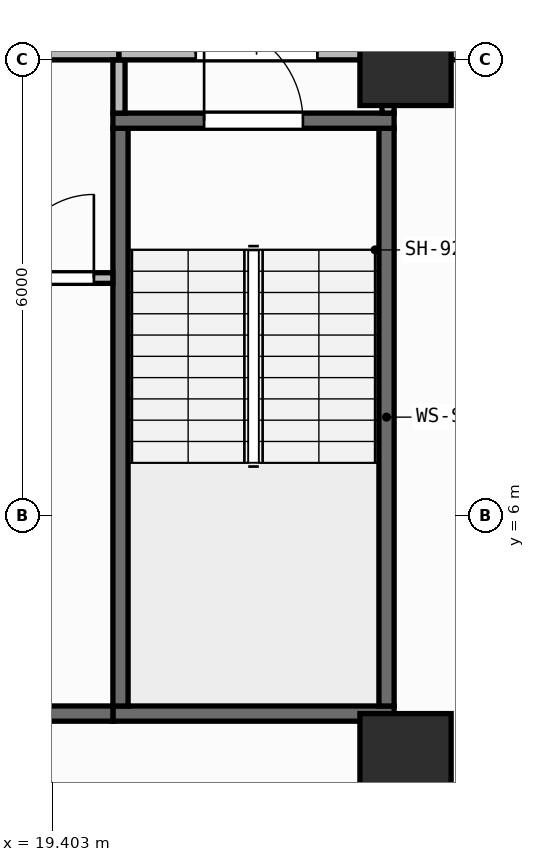
"""IFC4 building model, lengths in metres.
Left out: names, types, materials, properties, quantities, classifications, styles, units other than length and angle.
Written with IfcOpenShell. Run it as: python <this file> out.ifc"""

import sys

from ifc_helpers import new_model, si_unit, direction, frame, frame_2d, origin, origin_2d, place, context, subcontext, project, spatial, rectangle, extrude, element, fill, save


model = new_model("IFC4")
c1 = context("Model", 3, precision=1e-05, world=origin(), true_north=direction((0.0, 1.0)))
c2 = subcontext(c1, "Body", "Model", "MODEL_VIEW")
j1 = project(units=[si_unit("LENGTHUNIT", "METRE"), si_unit("PLANEANGLEUNIT", "RADIAN")], contexts=[c1])
p1 = place(None, origin())
s1 = spatial("IfcSite", under=j1, at=p1, CompositionType="ELEMENT")
p2 = place(p1, origin())
s2 = spatial("IfcBuilding", under=s1, at=p2, CompositionType="ELEMENT")
p3 = place(p2, frame((0.0, 0.0, 158.65)))
s3 = spatial("IfcBuildingStorey", under=s2, at=p3, CompositionType="ELEMENT", Elevation=158.65)
for number, where, z_axis, x_axis in (
    (1, (24.05, 2.8, 0.0), (0.0, 0.0, 1.0), (1.0, 0.0, 0.0)),
    (2, (24.05, 12.0, 0.0), (0.0, 0.0, 1.0), (1.0, 0.0, 0.0)),
):
    element("IfcColumn", number, at=place(p3, frame(where, z_axis=z_axis, x_axis=x_axis)), inside=s3, PredefinedType="COLUMN", context=c2, shape_type="SweptSolid", body=[
        extrude(rectangle(XDim=1.2, YDim=1.2, at=origin_2d()), origin(), (0.0, 0.0, 1.0), 3.95),
    ])
p4 = place(p3, frame((2.76, 0.173, 0.0), z_axis=(0.0, 0.0, 1.0), x_axis=(0.996857931723, 0.079210251617, 0.0)))
e3 = element("IfcWall", 3, at=p4, inside=s3, PredefinedType="STANDARD", context=c2, shape_type="SweptSolid", body=[
    extrude(rectangle(XDim=51.442, YDim=0.26, at=frame_2d((25.721, 0.0))), origin(), (0.0, 0.0, 1.0), 3.71),
])
p5 = place(p4, frame((24.521, 0.0, 0.9)))
e4 = element("IfcOpeningElement", 4, at=p5, cuts=e3, PredefinedType="OPENING", context=c2, shape_type="SweptSolid", body=[
    extrude(rectangle(XDim=2.4, YDim=1.65, at=frame_2d((1.2, 0.825))), frame((0.0, 0.14, 0.0), z_axis=(0.0, -1.0, 0.0), x_axis=(1.0, 0.0, 0.0)), (0.0, 0.0, 1.0), 0.28),
])
p6 = place(p3, frame((20.2, 3.4, 0.0), z_axis=(0.0, 0.0, 1.0), x_axis=(1.0, 0.0, 0.0)))
e5 = element("IfcWall", 5, at=p6, inside=s3, PredefinedType="SHEAR", context=c2, shape_type="SweptSolid", body=[
    extrude(rectangle(XDim=3.7, YDim=0.2, at=frame_2d((1.85, 0.0))), origin(), (0.0, 0.0, 1.0), 3.71),
])
for number, where, z_axis, x_axis in (
    (6, (20.3, 3.5, 0.0), (0.0, 0.0, 1.0), (0.0, 1.0, 0.0)),
    (7, (23.8, 3.5, 0.0), (0.0, 0.0, 1.0), (0.0, 1.0, 0.0)),
):
    element("IfcWall", number, at=place(p3, frame(where, z_axis=z_axis, x_axis=x_axis)), inside=s3, PredefinedType="SHEAR", context=c2, shape_type="SweptSolid", body=[
        extrude(rectangle(XDim=7.6, YDim=0.2, at=frame_2d((3.8, 0.0))), origin(), (0.0, 0.0, 1.0), 3.71),
    ])
p7 = place(p3, frame((20.2, 11.2, 0.0), z_axis=(0.0, 0.0, 1.0), x_axis=(1.0, 0.0, 0.0)))
e8 = element("IfcWall", 8, at=p7, inside=s3, PredefinedType="SHEAR", context=c2, shape_type="SweptSolid", body=[
    extrude(rectangle(XDim=3.7, YDim=0.2, at=frame_2d((1.85, 0.0))), origin(), (0.0, 0.0, 1.0), 3.71),
])
p8 = place(p7, frame((1.2, 0.0, 0.0)))
e9 = element("IfcOpeningElement", 9, at=p8, cuts=e8, PredefinedType="OPENING", context=c2, shape_type="SweptSolid", body=[
    extrude(rectangle(XDim=1.3, YDim=2.15, at=frame_2d((0.65, 1.075))), frame((0.0, 0.11, 0.0), z_axis=(0.0, -1.0, 0.0), x_axis=(1.0, 0.0, 0.0)), (0.0, 0.0, 1.0), 0.22),
])
p9 = place(p3, frame((6.5, 3.4, 0.0), z_axis=(0.0, 0.0, 1.0), x_axis=(1.0, 0.0, 0.0)))
e10 = element("IfcWall", 10, at=p9, inside=s3, PredefinedType="SHEAR", context=c2, shape_type="SweptSolid", body=[
    extrude(rectangle(XDim=13.7, YDim=0.2, at=frame_2d((6.85, 0.0))), origin(), (0.0, 0.0, 1.0), 3.71),
])
p10 = place(p3, frame((18.61, 9.13, 0.0), z_axis=(0.0, 0.0, 1.0), x_axis=(1.0, 0.0, 0.0)))
e11 = element("IfcWall", 11, at=p10, inside=s3, PredefinedType="PARTITIONING", context=c2, shape_type="SweptSolid", body=[
    extrude(rectangle(XDim=1.59, YDim=0.14, at=frame_2d((0.795, 0.0))), origin(), (0.0, 0.0, 1.0), 3.71),
])
p11 = place(p10, frame((0.24, 0.0, 0.0)))
e12 = element("IfcOpeningElement", 12, at=p11, cuts=e11, PredefinedType="OPENING", context=c2, shape_type="SweptSolid", body=[
    extrude(rectangle(XDim=1.1, YDim=2.1, at=frame_2d((0.55, 1.05))), frame((0.0, 0.08, 0.0), z_axis=(0.0, -1.0, 0.0), x_axis=(1.0, 0.0, 0.0)), (0.0, 0.0, 1.0), 0.16),
])
p12 = place(p3, frame((12.58, 12.08, 0.0), z_axis=(0.0, 0.0, 1.0), x_axis=(1.0, 0.0, 0.0)))
e13 = element("IfcWall", 13, at=p12, inside=s3, PredefinedType="PARTITIONING", context=c2, shape_type="SweptSolid", body=[
    extrude(rectangle(XDim=7.7, YDim=0.16, at=frame_2d((3.85, 0.0))), origin(), (0.0, 0.0, 1.0), 3.083),
])
p13 = place(p12, frame((3.05, 0.0, 0.0)))
e14 = element("IfcOpeningElement", 14, at=p13, cuts=e13, PredefinedType="OPENING", context=c2, shape_type="SweptSolid", body=[
    extrude(rectangle(XDim=1.6, YDim=2.05, at=frame_2d((0.8, 1.025))), frame((0.0, 0.09, 0.0), z_axis=(0.0, -1.0, 0.0), x_axis=(1.0, 0.0, 0.0)), (0.0, 0.0, 1.0), 0.18),
])
p14 = place(p3, frame((20.28, 11.3, 0.0), z_axis=(0.0, 0.0, 1.0), x_axis=(0.0, 1.0, 0.0)))
e15 = element("IfcWall", 15, at=p14, inside=s3, PredefinedType="PARTITIONING", context=c2, shape_type="SweptSolid", body=[
    extrude(rectangle(XDim=0.7, YDim=0.16, at=frame_2d((0.35, 0.0))), origin(), (0.0, 0.0, 1.0), 3.71),
])
p15 = place(p3, frame((20.28, 12.08, 0.0), z_axis=(0.0, 0.0, 1.0), x_axis=(1.0, 0.0, 0.0)))
e16 = element("IfcWall", 16, at=p15, inside=s3, PredefinedType="PARTITIONING", context=c2, shape_type="SweptSolid", body=[
    extrude(rectangle(XDim=3.62, YDim=0.16, at=frame_2d((1.81, 0.0))), origin(), (0.0, 0.0, 1.0), 3.083),
])
p16 = place(p15, frame((1.01, 0.0, 0.0)))
e17 = element("IfcOpeningElement", 17, at=p16, cuts=e16, PredefinedType="OPENING", context=c2, shape_type="SweptSolid", body=[
    extrude(rectangle(XDim=1.6, YDim=2.05, at=frame_2d((0.8, 1.025))), frame((0.0, 0.09, 0.0), z_axis=(0.0, -1.0, 0.0), x_axis=(1.0, 0.0, 0.0)), (0.0, 0.0, 1.0), 0.18),
])
p17 = place(p3, frame((23.82, 11.3, 0.0), z_axis=(0.0, 0.0, 1.0), x_axis=(0.0, 1.0, 0.0)))
e18 = element("IfcWall", 18, at=p17, inside=s3, PredefinedType="PARTITIONING", context=c2, shape_type="SweptSolid", body=[
    extrude(rectangle(XDim=0.7, YDim=0.16, at=frame_2d((0.35, 0.0))), origin(), (0.0, 0.0, 1.0), 3.71),
])
p18 = place(p3, frame((24.02, 12.08, 0.0), z_axis=(0.0, 0.0, 1.0), x_axis=(1.0, 0.0, 0.0)))
e19 = element("IfcWall", 19, at=p18, inside=s3, PredefinedType="PARTITIONING", context=c2, shape_type="SweptSolid", body=[
    extrude(rectangle(XDim=1.244, YDim=0.16, at=frame_2d((0.622, 0.0))), origin(), (0.0, 0.0, 1.0), 3.083),
])
p19 = place(p8, origin())
e20 = element("IfcDoor", 20, at=p19, inside=s3, OperationType="SINGLE_SWING_LEFT", PredefinedType="DOOR", context=c2, shape_type="SweptSolid", body=[
    extrude(rectangle(XDim=1.3, YDim=2.15, at=frame_2d((0.65, 1.075))), frame((0.0, 0.025, 0.0), z_axis=(0.0, -1.0, 0.0), x_axis=(1.0, 0.0, 0.0)), (0.0, 0.0, 1.0), 0.05),
])
fill(e9, e20)
p20 = place(p11, origin())
e21 = element("IfcDoor", 21, at=p20, inside=s3, OperationType="SINGLE_SWING_RIGHT", PredefinedType="DOOR", context=c2, shape_type="SweptSolid", body=[
    extrude(rectangle(XDim=1.1, YDim=2.1, at=frame_2d((0.55, 1.05))), frame((0.0, 0.025, 0.0), z_axis=(0.0, -1.0, 0.0), x_axis=(1.0, 0.0, 0.0)), (0.0, 0.0, 1.0), 0.05),
])
fill(e12, e21)
p21 = place(p16, origin())
e22 = element("IfcDoor", 22, at=p21, inside=s3, OperationType="DOUBLE_DOOR_SINGLE_SWING", PredefinedType="DOOR", context=c2, shape_type="SweptSolid", body=[
    extrude(rectangle(XDim=1.6, YDim=2.05, at=frame_2d((0.8, 1.025))), frame((0.0, 0.025, 0.0), z_axis=(0.0, -1.0, 0.0), x_axis=(1.0, 0.0, 0.0)), (0.0, 0.0, 1.0), 0.05),
])
fill(e17, e22)
save(model, sys.argv[1])
